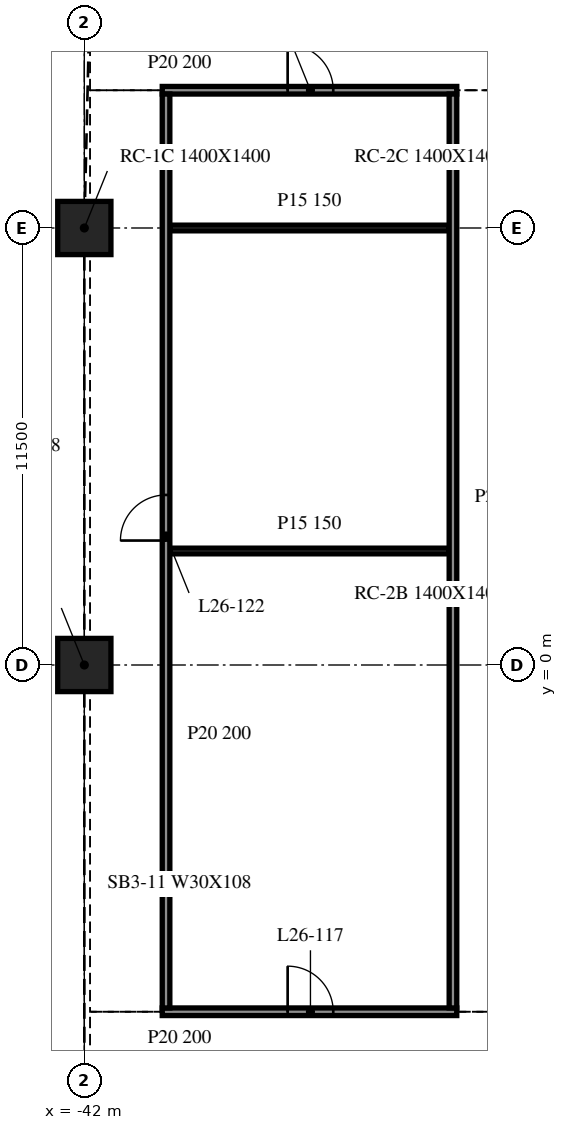
"""IFC4 building model, lengths in metres.
Left out: names, types, materials, properties, quantities, classifications, styles, units other than length and angle.
Written with IfcOpenShell. Run it as: python <this file> out.ifc"""

import sys

from ifc_helpers import new_model, si_unit, direction, frame, frame_2d, origin, origin_2d, place, context, subcontext, project, spatial, rectangle, extrude, element, fill, save


model = new_model("IFC4")
c1 = context("Model", 3, precision=1e-05, world=origin(), true_north=direction((0.0, 1.0)))
c2 = subcontext(c1, "Body", "Model", "MODEL_VIEW")
j1 = project(units=[si_unit("LENGTHUNIT", "METRE"), si_unit("PLANEANGLEUNIT", "RADIAN")], contexts=[c1])
p1 = place(None, origin())
s1 = spatial("IfcSite", under=j1, at=p1, CompositionType="ELEMENT")
p2 = place(p1, origin())
s2 = spatial("IfcBuilding", under=s1, at=p2, CompositionType="ELEMENT")
p3 = place(p2, frame((0.0, 0.0, 113.5)))
s3 = spatial("IfcBuildingStorey", under=s2, at=p3, CompositionType="ELEMENT", Elevation=113.5)
for number, where, z_axis, x_axis in (
    (1, (-42.0, 0.0, -0.34), (0.0, 0.0, 1.0), (1.0, 0.0, 0.0)),
    (2, (-42.0, 11.5, -0.34), (0.0, 0.0, 1.0), (1.0, 0.0, 0.0)),
):
    element("IfcColumn", number, at=place(p3, frame(where, z_axis=z_axis, x_axis=x_axis)), inside=s3, PredefinedType="COLUMN", context=c2, shape_type="SweptSolid", body=[
        extrude(rectangle(XDim=1.4, YDim=1.4, at=origin_2d()), origin(), (0.0, 0.0, 1.0), 3.89),
    ])
p4 = place(p3, frame((-39.95, -9.125, 0.0), z_axis=(0.0, 0.0, 1.0), x_axis=(1.0, 0.0, 0.0)))
e3 = element("IfcWall", 3, at=p4, inside=s3, PredefinedType="PARTITIONING", context=c2, shape_type="SweptSolid", body=[
    extrude(rectangle(XDim=7.75, YDim=0.2, at=frame_2d((3.875, 0.0))), origin(), (0.0, 0.0, 1.0), 3.55),
])
p5 = place(p4, frame((3.3, 0.0, 0.0)))
e4 = element("IfcOpeningElement", 4, at=p5, cuts=e3, PredefinedType="OPENING", context=c2, shape_type="SweptSolid", body=[
    extrude(rectangle(XDim=1.2, YDim=2.1, at=frame_2d((0.6, 1.05))), frame((0.0, 0.11, 0.0), z_axis=(0.0, -1.0, 0.0), x_axis=(1.0, 0.0, 0.0)), (0.0, 0.0, 1.0), 0.22),
])
p6 = place(p3, frame((-39.75, 3.0, 0.0), z_axis=(0.0, 0.0, 1.0), x_axis=(1.0, 0.0, 0.0)))
e5 = element("IfcWall", 5, at=p6, inside=s3, PredefinedType="PARTITIONING", context=c2, shape_type="SweptSolid", body=[
    extrude(rectangle(XDim=7.35, YDim=0.15, at=frame_2d((3.675, 0.0))), origin(), (0.0, 0.0, 1.0), 3.55),
])
p7 = place(p3, frame((-39.75, 11.5, 0.0), z_axis=(0.0, 0.0, 1.0), x_axis=(1.0, 0.0, 0.0)))
e6 = element("IfcWall", 6, at=p7, inside=s3, PredefinedType="PARTITIONING", context=c2, shape_type="SweptSolid", body=[
    extrude(rectangle(XDim=7.35, YDim=0.15, at=frame_2d((3.675, 0.0))), origin(), (0.0, 0.0, 1.0), 2.551),
])
p8 = place(p3, frame((-39.95, 15.125, 0.0), z_axis=(0.0, 0.0, 1.0), x_axis=(1.0, 0.0, 0.0)))
e7 = element("IfcWall", 7, at=p8, inside=s3, PredefinedType="PARTITIONING", context=c2, shape_type="SweptSolid", body=[
    extrude(rectangle(XDim=7.75, YDim=0.2, at=frame_2d((3.875, 0.0))), origin(), (0.0, 0.0, 1.0), 3.55),
])
p9 = place(p8, frame((3.3, 0.0, 0.0)))
e8 = element("IfcOpeningElement", 8, at=p9, cuts=e7, PredefinedType="OPENING", context=c2, shape_type="SweptSolid", body=[
    extrude(rectangle(XDim=1.2, YDim=2.1, at=frame_2d((0.6, 1.05))), frame((0.0, 0.11, 0.0), z_axis=(0.0, -1.0, 0.0), x_axis=(1.0, 0.0, 0.0)), (0.0, 0.0, 1.0), 0.22),
])
p10 = place(p3, frame((-39.85, -9.025, 0.0), z_axis=(0.0, 0.0, 1.0), x_axis=(0.0, 1.0, 0.0)))
e9 = element("IfcWall", 9, at=p10, inside=s3, PredefinedType="PARTITIONING", context=c2, shape_type="SweptSolid", body=[
    extrude(rectangle(XDim=24.05, YDim=0.2, at=frame_2d((12.025, 0.0))), origin(), (0.0, 0.0, 1.0), 3.55),
])
p11 = place(p10, frame((12.3, 0.0, 0.0)))
e10 = element("IfcOpeningElement", 10, at=p11, cuts=e9, PredefinedType="OPENING", context=c2, shape_type="SweptSolid", body=[
    extrude(rectangle(XDim=1.2, YDim=2.1, at=frame_2d((0.6, 1.05))), frame((0.0, 0.11, 0.0), z_axis=(0.0, -1.0, 0.0), x_axis=(1.0, 0.0, 0.0)), (0.0, 0.0, 1.0), 0.22),
])
p12 = place(p3, frame((-32.3, -9.025, 0.0), z_axis=(0.0, 0.0, 1.0), x_axis=(0.0, 1.0, 0.0)))
e11 = element("IfcWall", 11, at=p12, inside=s3, PredefinedType="PARTITIONING", context=c2, shape_type="SweptSolid", body=[
    extrude(rectangle(XDim=24.05, YDim=0.2, at=frame_2d((12.025, 0.0))), origin(), (0.0, 0.0, 1.0), 3.55),
])
p13 = place(p5, origin())
e12 = element("IfcDoor", 12, at=p13, inside=s3, OperationType="SINGLE_SWING_RIGHT", PredefinedType="DOOR", context=c2, shape_type="SweptSolid", body=[
    extrude(rectangle(XDim=1.2, YDim=2.1, at=frame_2d((0.6, 1.05))), frame((0.0, 0.025, 0.0), z_axis=(0.0, -1.0, 0.0), x_axis=(1.0, 0.0, 0.0)), (0.0, 0.0, 1.0), 0.05),
])
fill(e4, e12)
p14 = place(p11, origin())
e13 = element("IfcDoor", 13, at=p14, inside=s3, OperationType="SINGLE_SWING_LEFT", PredefinedType="DOOR", context=c2, shape_type="SweptSolid", body=[
    extrude(rectangle(XDim=1.2, YDim=2.1, at=frame_2d((0.6, 1.05))), frame((0.0, 0.025, 0.0), z_axis=(0.0, -1.0, 0.0), x_axis=(1.0, 0.0, 0.0)), (0.0, 0.0, 1.0), 0.05),
])
fill(e10, e13)
p15 = place(p9, origin())
e14 = element("IfcDoor", 14, at=p15, inside=s3, OperationType="SINGLE_SWING_LEFT", PredefinedType="DOOR", context=c2, shape_type="SweptSolid", body=[
    extrude(rectangle(XDim=1.2, YDim=2.1, at=frame_2d((0.6, 1.05))), frame((0.0, 0.025, 0.0), z_axis=(0.0, -1.0, 0.0), x_axis=(1.0, 0.0, 0.0)), (0.0, 0.0, 1.0), 0.05),
])
fill(e8, e14)
save(model, sys.argv[1])
